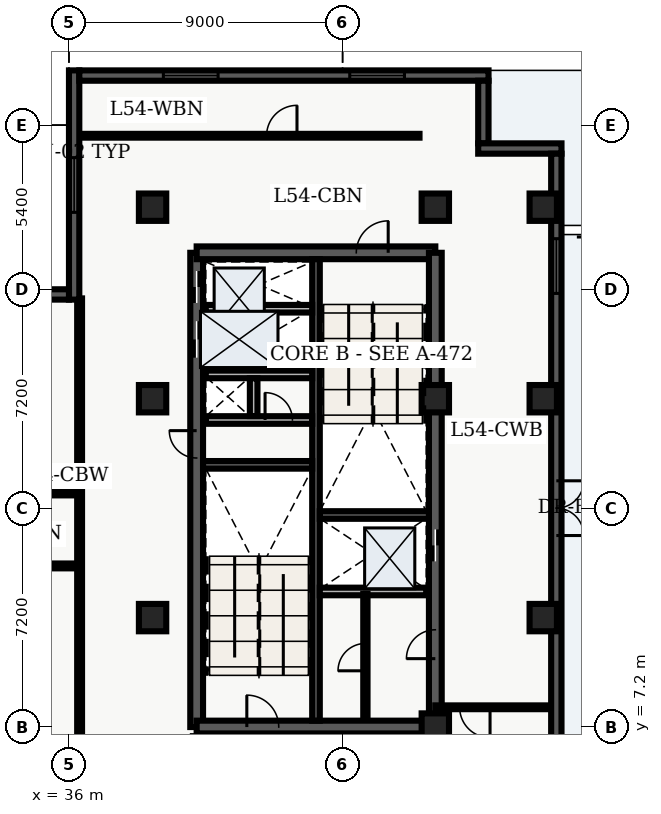
"""IFC4 building model, lengths in metres.
Left out: names, types, materials, properties, quantities, classifications, styles, units other than length and angle.
Written with IfcOpenShell. Run it as: python <this file> out.ifc"""

import sys

from ifc_helpers import new_model, entity, si_unit, converted_unit, direction, frame, origin_with_axes, origin_2d_with_axis, place, context, subcontext, project, spatial, polyline, rectangle, outline, extrude, element, fill, save


model = new_model("IFC4")
c1 = context("Model", 3, precision=1e-05, world=origin_with_axes(), true_north=direction((0.0, 1.0)))
c2 = subcontext(c1, "Body", "Model", "MODEL_VIEW")
j1 = project(units=[si_unit("LENGTHUNIT", "METRE"), converted_unit("PLANEANGLEUNIT", "DEGREE", entity("IfcPlaneAngleMeasure", 0.017), si_unit("PLANEANGLEUNIT", "RADIAN"), dimensions=[0, 0, 0, 0, 0, 0, 0])], contexts=[c1])
p1 = place(None, origin_with_axes())
s1 = spatial("IfcSite", under=j1, at=p1, CompositionType="ELEMENT")
p2 = place(p1, origin_with_axes())
s2 = spatial("IfcBuilding", under=s1, at=p2, CompositionType="ELEMENT")
p3 = place(p2, frame((0.0, 0.0, 219.9), z_axis=(0.0, 0.0, 1.0), x_axis=(1.0, 0.0, 0.0)))
s3 = spatial("IfcBuildingStorey", under=s2, at=p3, CompositionType="ELEMENT", Elevation=219.9)
p4 = place(p3, frame((40.2, 7.2, 0.0), z_axis=(0.0, 0.0, 1.0), x_axis=(0.0, 1.0, 0.0)))
e1 = element("IfcWall", 1, at=p4, inside=s3, PredefinedType="SHEAR", context=c2, shape_type="SweptSolid", body=[
    extrude(outline(polyline([(0.0, -0.21), (15.6, -0.21), (15.6, 0.21), (0.0, 0.21), (0.0, -0.21)])), origin_with_axes(), (0.0, 0.0, 1.0), 4.56),
])
p5 = place(p4, frame((14.475, 0.0, 0.0), z_axis=(0.0, 0.0, 1.0), x_axis=(1.0, 0.0, 0.0)))
e2 = element("IfcOpeningElement", 2, at=p5, cuts=e1, PredefinedType="OPENING", context=c2, shape_type="SweptSolid", body=[
    extrude(rectangle(XDim=1.05, YDim=0.44, at=origin_2d_with_axis()), origin_with_axes(), (0.0, 0.0, 1.0), 2.15),
])
p6 = place(p4, frame((12.75, 0.0, 0.0), z_axis=(0.0, 0.0, 1.0), x_axis=(1.0, 0.0, 0.0)))
e3 = element("IfcOpeningElement", 3, at=p6, cuts=e1, PredefinedType="OPENING", context=c2, shape_type="SweptSolid", body=[
    extrude(rectangle(XDim=1.2, YDim=0.44, at=origin_2d_with_axis()), origin_with_axes(), (0.0, 0.0, 1.0), 2.15),
])
p7 = place(p4, frame((9.3, 0.0, 0.0), z_axis=(0.0, 0.0, 1.0), x_axis=(1.0, 0.0, 0.0)))
e4 = element("IfcOpeningElement", 4, at=p7, cuts=e1, PredefinedType="OPENING", context=c2, shape_type="SweptSolid", body=[
    extrude(rectangle(XDim=0.9, YDim=0.44, at=origin_2d_with_axis()), origin_with_axes(), (0.0, 0.0, 1.0), 2.15),
])
p8 = place(p3, frame((40.2, 7.2, 0.0), z_axis=(0.0, 0.0, 1.0), x_axis=(1.0, 0.0, 0.0)))
e5 = element("IfcWall", 5, at=p8, inside=s3, PredefinedType="SHEAR", context=c2, shape_type="SweptSolid", body=[
    extrude(outline(polyline([(0.0, -0.21), (7.85, -0.21), (7.85, 0.21), (0.0, 0.21), (0.0, -0.21)])), origin_with_axes(), (0.0, 0.0, 1.0), 4.56),
])
p9 = place(p8, frame((2.175, 0.0, 0.0), z_axis=(0.0, 0.0, 1.0), x_axis=(1.0, 0.0, 0.0)))
e6 = element("IfcOpeningElement", 6, at=p9, cuts=e5, PredefinedType="OPENING", context=c2, shape_type="SweptSolid", body=[
    extrude(rectangle(XDim=1.05, YDim=0.44, at=origin_2d_with_axis()), origin_with_axes(), (0.0, 0.0, 1.0), 2.15),
])
p10 = place(p3, frame((40.2, 22.8, 0.0), z_axis=(0.0, 0.0, 1.0), x_axis=(1.0, 0.0, 0.0)))
e7 = element("IfcWall", 7, at=p10, inside=s3, PredefinedType="SHEAR", context=c2, shape_type="SweptSolid", body=[
    extrude(outline(polyline([(0.0, -0.21), (7.85, -0.21), (7.85, 0.21), (0.0, 0.21), (0.0, -0.21)])), origin_with_axes(), (0.0, 0.0, 1.0), 4.56),
])
p11 = place(p10, frame((5.775, 0.0, 0.0), z_axis=(0.0, 0.0, 1.0), x_axis=(1.0, 0.0, 0.0)))
e8 = element("IfcOpeningElement", 8, at=p11, cuts=e7, PredefinedType="OPENING", context=c2, shape_type="SweptSolid", body=[
    extrude(rectangle(XDim=1.05, YDim=0.44, at=origin_2d_with_axis()), origin_with_axes(), (0.0, 0.0, 1.0), 2.15),
])
p12 = place(p3, frame((48.05, 7.2, 0.0), z_axis=(0.0, 0.0, 1.0), x_axis=(0.0, 1.0, 0.0)))
e9 = element("IfcWall", 9, at=p12, inside=s3, PredefinedType="SHEAR", context=c2, shape_type="SweptSolid", body=[
    extrude(outline(polyline([(0.0, -0.21), (15.6, -0.21), (15.6, 0.21), (0.0, 0.21), (0.0, -0.21)])), origin_with_axes(), (0.0, 0.0, 1.0), 4.56),
])
p13 = place(p12, frame((5.975, 0.0, 0.0), z_axis=(0.0, 0.0, 1.0), x_axis=(1.0, 0.0, 0.0)))
e10 = element("IfcOpeningElement", 10, at=p13, cuts=e9, PredefinedType="OPENING", context=c2, shape_type="SweptSolid", body=[
    extrude(rectangle(XDim=1.05, YDim=0.44, at=origin_2d_with_axis()), origin_with_axes(), (0.0, 0.0, 1.0), 2.15),
])
p14 = place(p12, frame((2.725, 0.0, 0.0), z_axis=(0.0, 0.0, 1.0), x_axis=(1.0, 0.0, 0.0)))
e11 = element("IfcOpeningElement", 11, at=p14, cuts=e9, PredefinedType="OPENING", context=c2, shape_type="SweptSolid", body=[
    extrude(rectangle(XDim=0.95, YDim=0.44, at=origin_2d_with_axis()), origin_with_axes(), (0.0, 0.0, 1.0), 2.15),
])
p15 = place(p3, frame((44.125, 7.41, 0.0), z_axis=(0.0, 0.0, 1.0), x_axis=(0.0, 1.0, 0.0)))
e12 = element("IfcWall", 12, at=p15, inside=s3, PredefinedType="SHEAR", context=c2, shape_type="SweptSolid", body=[
    extrude(outline(polyline([(0.0, -0.125), (15.18, -0.125), (15.18, 0.125), (0.0, 0.125), (0.0, -0.125)])), origin_with_axes(), (0.0, 0.0, 1.0), 4.56),
])
for number, where, z_axis, x_axis in (
    (13, (40.41, 15.825, 0.0), (0.0, 0.0, 1.0), (1.0, 0.0, 0.0)),
    (14, (44.25, 14.175, 0.0), (0.0, 0.0, 1.0), (1.0, 0.0, 0.0)),
):
    element("IfcWall", number, at=place(p3, frame(where, z_axis=z_axis, x_axis=x_axis)), inside=s3, PredefinedType="SHEAR", context=c2, shape_type="SweptSolid", body=[
        extrude(outline(polyline([(0.0, -0.125), (3.59, -0.125), (3.59, 0.125), (0.0, 0.125), (0.0, -0.125)])), origin_with_axes(), (0.0, 0.0, 1.0), 4.56),
    ])
p16 = place(p3, frame((40.5, 17.3, 0.0), z_axis=(0.0, 0.0, 1.0), x_axis=(1.0, 0.0, 0.0)))
e15 = element("IfcWall", 15, at=p16, inside=s3, PredefinedType="SOLIDWALL", context=c2, shape_type="SweptSolid", body=[
    extrude(outline(polyline([(0.0, -0.125), (3.5, -0.125), (3.5, 0.125), (0.0, 0.125), (0.0, -0.125)])), origin_with_axes(), (0.0, 0.0, 1.0), 3.6),
])
p17 = place(p16, frame((2.4, 0.0, 0.0), z_axis=(0.0, 0.0, 1.0), x_axis=(1.0, 0.0, 0.0)))
e16 = element("IfcOpeningElement", 16, at=p17, cuts=e15, PredefinedType="OPENING", context=c2, shape_type="SweptSolid", body=[
    extrude(rectangle(XDim=0.9, YDim=0.27, at=origin_2d_with_axis()), origin_with_axes(), (0.0, 0.0, 1.0), 2.15),
])
p18 = place(p3, frame((40.5, 18.8, 0.0), z_axis=(0.0, 0.0, 1.0), x_axis=(1.0, 0.0, 0.0)))
e17 = element("IfcWall", 17, at=p18, inside=s3, PredefinedType="SOLIDWALL", context=c2, shape_type="SweptSolid", body=[
    extrude(outline(polyline([(0.0, -0.125), (3.5, -0.125), (3.5, 0.125), (0.0, 0.125), (0.0, -0.125)])), origin_with_axes(), (0.0, 0.0, 1.0), 3.6),
])
p19 = place(p3, frame((42.075, 17.43, 0.0), z_axis=(0.0, 0.0, 1.0), x_axis=(0.0, 1.0, 0.0)))
e18 = element("IfcWall", 18, at=p19, inside=s3, PredefinedType="SOLIDWALL", context=c2, shape_type="SweptSolid", body=[
    extrude(outline(polyline([(0.0, -0.125), (1.24, -0.125), (1.24, 0.125), (0.0, 0.125), (0.0, -0.125)])), origin_with_axes(), (0.0, 0.0, 1.0), 3.6),
])
for number, where, z_axis, x_axis in (
    (19, (38.75, 10.8, 0.0), (0.0, 0.0, 1.0), (1.0, 0.0, 0.0)),
    (20, (38.75, 18.0, 0.0), (0.0, 0.0, 1.0), (1.0, 0.0, 0.0)),
    (21, (38.75, 24.3, 0.0), (0.0, 0.0, 1.0), (1.0, 0.0, 0.0)),
    (22, (48.05, 7.2, 0.0), (0.0, 0.0, 1.0), (1.0, 0.0, 0.0)),
    (23, (48.05, 18.0, 0.0), (0.0, 0.0, 1.0), (1.0, 0.0, 0.0)),
    (24, (48.05, 24.3, 0.0), (0.0, 0.0, 1.0), (1.0, 0.0, 0.0)),
    (25, (51.6, 10.8, 0.0), (0.0, 0.0, 1.0), (1.0, 0.0, 0.0)),
    (26, (51.6, 18.0, 0.0), (0.0, 0.0, 1.0), (1.0, 0.0, 0.0)),
    (27, (51.6, 24.3, 0.0), (0.0, 0.0, 1.0), (1.0, 0.0, 0.0)),
):
    element("IfcColumn", number, at=place(p3, frame(where, z_axis=z_axis, x_axis=x_axis)), inside=s3, PredefinedType="COLUMN", context=c2, shape_type="SweptSolid", body=[
        extrude(rectangle(XDim=0.9, YDim=0.9, at=origin_2d_with_axis()), origin_with_axes(), (0.0, 0.0, 1.0), 4.8),
    ])
for number, where, z_axis, x_axis in (
    (28, (40.5, 20.96, 0.0), (0.0, 0.0, 1.0), (1.0, 0.0, 0.0)),
    (29, (44.25, 11.66, 0.0), (0.0, 0.0, 1.0), (1.0, 0.0, 0.0)),
):
    element("IfcWall", number, at=place(p3, frame(where, z_axis=z_axis, x_axis=x_axis)), inside=s3, PredefinedType="SOLIDWALL", context=c2, shape_type="SweptSolid", body=[
        extrude(outline(polyline([(0.0, -0.125), (3.5, -0.125), (3.5, 0.125), (0.0, 0.125), (0.0, -0.125)])), origin_with_axes(), (0.0, 0.0, 1.0), 3.2),
    ])
p20 = place(p3, frame((45.75, 7.5, 0.0), z_axis=(0.0, 0.0, 1.0), x_axis=(0.0, 1.0, 0.0)))
e30 = element("IfcWall", 30, at=p20, inside=s3, PredefinedType="PARTITIONING", context=c2, shape_type="SweptSolid", body=[
    extrude(outline(polyline([(0.0, -0.07), (4.08, -0.07), (4.08, 0.07), (0.0, 0.07), (0.0, -0.07)])), origin_with_axes(), (0.0, 0.0, 1.0), 3.2),
])
p21 = place(p20, frame((2.0, 0.0, 0.0), z_axis=(0.0, 0.0, 1.0), x_axis=(1.0, 0.0, 0.0)))
e31 = element("IfcOpeningElement", 31, at=p21, cuts=e30, PredefinedType="OPENING", context=c2, shape_type="SweptSolid", body=[
    extrude(rectangle(XDim=0.9, YDim=0.16, at=origin_2d_with_axis()), origin_with_axes(), (0.0, 0.0, 1.0), 2.15),
])
p22 = place(p3, frame((21.15, 12.5, 0.0), z_axis=(0.0, 0.0, 1.0), x_axis=(1.0, 0.0, 0.0)))
e32 = element("IfcWall", 32, at=p22, inside=s3, PredefinedType="PARTITIONING", context=c2, shape_type="SweptSolid", body=[
    extrude(outline(polyline([(0.0, -0.08), (15.2, -0.08), (15.2, 0.08), (0.0, 0.08), (0.0, -0.08)])), origin_with_axes(), (0.0, 0.0, 1.0), 3.2),
])
p23 = place(p22, frame((7.65, 0.0, 0.0), z_axis=(0.0, 0.0, 1.0), x_axis=(1.0, 0.0, 0.0)))
e33 = element("IfcOpeningElement", 33, at=p23, cuts=e32, PredefinedType="OPENING", context=c2, shape_type="SweptSolid", body=[
    extrude(rectangle(XDim=1.0, YDim=0.18, at=origin_2d_with_axis()), origin_with_axes(), (0.0, 0.0, 1.0), 2.15),
])
p24 = place(p3, frame((21.15, 14.9, 0.0), z_axis=(0.0, 0.0, 1.0), x_axis=(1.0, 0.0, 0.0)))
e34 = element("IfcWall", 34, at=p24, inside=s3, PredefinedType="PARTITIONING", context=c2, shape_type="SweptSolid", body=[
    extrude(outline(polyline([(0.0, -0.08), (15.2, -0.08), (15.2, 0.08), (0.0, 0.08), (0.0, -0.08)])), origin_with_axes(), (0.0, 0.0, 1.0), 3.2),
])
p25 = place(p24, frame((3.583, 0.0, 0.0), z_axis=(0.0, 0.0, 1.0), x_axis=(1.0, 0.0, 0.0)))
e35 = element("IfcOpeningElement", 35, at=p25, cuts=e34, PredefinedType="OPENING", context=c2, shape_type="SweptSolid", body=[
    extrude(rectangle(XDim=1.0, YDim=0.18, at=origin_2d_with_axis()), origin_with_axes(), (0.0, 0.0, 1.0), 2.15),
])
p26 = place(p24, frame((11.053, 0.0, 0.0), z_axis=(0.0, 0.0, 1.0), x_axis=(1.0, 0.0, 0.0)))
e36 = element("IfcOpeningElement", 36, at=p26, cuts=e34, PredefinedType="OPENING", context=c2, shape_type="SweptSolid", body=[
    extrude(rectangle(XDim=1.0, YDim=0.18, at=origin_2d_with_axis()), origin_with_axes(), (0.0, 0.0, 1.0), 2.15),
])
p27 = place(p3, frame((36.35, 4.35, 0.0), z_axis=(0.0, 0.0, 1.0), x_axis=(0.0, 1.0, 0.0)))
e37 = element("IfcWall", 37, at=p27, inside=s3, PredefinedType="PARTITIONING", context=c2, shape_type="SweptSolid", body=[
    extrude(outline(polyline([(0.0, -0.08), (16.95, -0.08), (16.95, 0.08), (0.0, 0.08), (0.0, -0.08)])), origin_with_axes(), (0.0, 0.0, 1.0), 3.2),
])
p28 = place(p3, frame((51.865, 7.85, 0.0), z_axis=(0.0, 0.0, 1.0), x_axis=(-1.0, 0.0, 0.0)))
e38 = element("IfcWall", 38, at=p28, inside=s3, PredefinedType="PARTITIONING", context=c2, shape_type="SweptSolid", body=[
    extrude(outline(polyline([(0.0, -0.062), (3.815, -0.062), (3.815, 0.062), (0.0, 0.062), (0.0, -0.062)])), origin_with_axes(), (0.0, 0.0, 1.0), 3.2),
])
p29 = place(p28, frame((2.515, 0.0, 0.0), z_axis=(0.0, 0.0, 1.0), x_axis=(1.0, 0.0, 0.0)))
e39 = element("IfcOpeningElement", 39, at=p29, cuts=e38, PredefinedType="OPENING", context=c2, shape_type="SweptSolid", body=[
    extrude(rectangle(XDim=1.0, YDim=0.145, at=origin_2d_with_axis()), origin_with_axes(), (0.0, 0.0, 1.0), 2.15),
])
p30 = place(p3, frame((36.335, 26.65, 0.0), z_axis=(0.0, 0.0, 1.0), x_axis=(1.0, 0.0, 0.0)))
e40 = element("IfcWall", 40, at=p30, inside=s3, PredefinedType="PARTITIONING", context=c2, shape_type="SweptSolid", body=[
    extrude(outline(polyline([(0.0, -0.062), (11.195, -0.062), (11.195, 0.062), (0.0, 0.062), (0.0, -0.062)])), origin_with_axes(), (0.0, 0.0, 1.0), 3.2),
])
p31 = place(p30, frame((6.665, 0.0, 0.0), z_axis=(0.0, 0.0, 1.0), x_axis=(1.0, 0.0, 0.0)))
e41 = element("IfcOpeningElement", 41, at=p31, cuts=e40, PredefinedType="OPENING", context=c2, shape_type="SweptSolid", body=[
    extrude(rectangle(XDim=1.0, YDim=0.145, at=origin_2d_with_axis()), origin_with_axes(), (0.0, 0.0, 1.0), 2.15),
])
p32 = place(p3, frame((36.17, 21.26, 0.0), z_axis=(0.0, 0.0, 1.0), x_axis=(0.0, 1.0, 0.0)))
e42 = element("IfcWall", 42, at=p32, inside=s3, PredefinedType="SOLIDWALL", context=c2, shape_type="SweptSolid", body=[
    extrude(outline(polyline([(0.0, -0.17), (7.54, -0.17), (7.54, 0.17), (0.0, 0.17), (0.0, -0.17)])), origin_with_axes(), (0.0, 0.0, 1.0), 4.56),
])
p33 = place(p32, frame((3.77, 0.0, 0.45), z_axis=(0.0, 0.0, 1.0), x_axis=(1.0, 0.0, 0.0)))
e43 = element("IfcOpeningElement", 43, at=p33, cuts=e42, PredefinedType="OPENING", context=c2, shape_type="SweptSolid", body=[
    extrude(rectangle(XDim=1.8, YDim=0.36, at=origin_2d_with_axis()), origin_with_axes(), (0.0, 0.0, 1.0), 2.1),
])
p34 = place(p3, frame((36.34, 28.63, 0.0), z_axis=(0.0, 0.0, 1.0), x_axis=(1.0, 0.0, 0.0)))
e44 = element("IfcWall", 44, at=p34, inside=s3, PredefinedType="SOLIDWALL", context=c2, shape_type="SweptSolid", body=[
    extrude(outline(polyline([(0.0, -0.17), (13.46, -0.17), (13.46, 0.17), (0.0, 0.17), (0.0, -0.17)])), origin_with_axes(), (0.0, 0.0, 1.0), 4.56),
])
p35 = place(p34, frame((3.665, 0.0, 0.45), z_axis=(0.0, 0.0, 1.0), x_axis=(1.0, 0.0, 0.0)))
e45 = element("IfcOpeningElement", 45, at=p35, cuts=e44, PredefinedType="OPENING", context=c2, shape_type="SweptSolid", body=[
    extrude(rectangle(XDim=1.8, YDim=0.36, at=origin_2d_with_axis()), origin_with_axes(), (0.0, 0.0, 1.0), 2.1),
])
p36 = place(p34, frame((9.795, 0.0, 0.45), z_axis=(0.0, 0.0, 1.0), x_axis=(1.0, 0.0, 0.0)))
e46 = element("IfcOpeningElement", 46, at=p36, cuts=e44, PredefinedType="OPENING", context=c2, shape_type="SweptSolid", body=[
    extrude(rectangle(XDim=1.8, YDim=0.36, at=origin_2d_with_axis()), origin_with_axes(), (0.0, 0.0, 1.0), 2.1),
])
p37 = place(p3, frame((49.63, 28.46, 0.0), z_axis=(0.0, 0.0, 1.0), x_axis=(0.0, -1.0, 0.0)))
e47 = element("IfcWall", 47, at=p37, inside=s3, PredefinedType="SOLIDWALL", context=c2, shape_type="SweptSolid", body=[
    extrude(outline(polyline([(0.0, -0.17), (2.06, -0.17), (2.06, 0.17), (0.0, 0.17), (0.0, -0.17)])), origin_with_axes(), (0.0, 0.0, 1.0), 4.56),
])
p38 = place(p3, frame((49.46, 26.23, 0.0), z_axis=(0.0, 0.0, 1.0), x_axis=(1.0, 0.0, 0.0)))
e48 = element("IfcWall", 48, at=p38, inside=s3, PredefinedType="SOLIDWALL", context=c2, shape_type="SweptSolid", body=[
    extrude(outline(polyline([(0.0, -0.17), (2.74, -0.17), (2.74, 0.17), (0.0, 0.17), (0.0, -0.17)])), origin_with_axes(), (0.0, 0.0, 1.0), 4.56),
])
p39 = place(p3, frame((52.03, 26.06, 0.0), z_axis=(0.0, 0.0, 1.0), x_axis=(0.0, -1.0, 0.0)))
e49 = element("IfcWall", 49, at=p39, inside=s3, PredefinedType="SOLIDWALL", context=c2, shape_type="SweptSolid", body=[
    extrude(outline(polyline([(0.0, -0.17), (23.66, -0.17), (23.66, 0.17), (0.0, 0.17), (0.0, -0.17)])), origin_with_axes(), (0.0, 0.0, 1.0), 4.56),
])
p40 = place(p39, frame((11.66, 0.0, 0.0), z_axis=(0.0, 0.0, 1.0), x_axis=(1.0, 0.0, 0.0)))
e50 = element("IfcOpeningElement", 50, at=p40, cuts=e49, PredefinedType="OPENING", context=c2, shape_type="SweptSolid", body=[
    extrude(rectangle(XDim=1.8, YDim=0.36, at=origin_2d_with_axis()), origin_with_axes(), (0.0, 0.0, 1.0), 2.3),
])
p41 = place(p39, frame((3.696, 0.0, 0.45), z_axis=(0.0, 0.0, 1.0), x_axis=(1.0, 0.0, 0.0)))
e51 = element("IfcOpeningElement", 51, at=p41, cuts=e49, PredefinedType="OPENING", context=c2, shape_type="SweptSolid", body=[
    extrude(rectangle(XDim=1.8, YDim=0.36, at=origin_2d_with_axis()), origin_with_axes(), (0.0, 0.0, 1.0), 2.1),
])
p42 = place(p39, frame((20.364, 0.0, 0.45), z_axis=(0.0, 0.0, 1.0), x_axis=(1.0, 0.0, 0.0)))
e52 = element("IfcOpeningElement", 52, at=p42, cuts=e49, PredefinedType="OPENING", context=c2, shape_type="SweptSolid", body=[
    extrude(rectangle(XDim=1.8, YDim=0.36, at=origin_2d_with_axis()), origin_with_axes(), (0.0, 0.0, 1.0), 2.1),
])
p43 = place(p3, frame((32.06, 21.43, 0.0), z_axis=(0.0, 0.0, 1.0), x_axis=(1.0, 0.0, 0.0)))
e53 = element("IfcWall", 53, at=p43, inside=s3, PredefinedType="SOLIDWALL", context=c2, shape_type="SweptSolid", body=[
    extrude(outline(polyline([(0.0, -0.17), (3.94, -0.17), (3.94, 0.17), (0.0, 0.17), (0.0, -0.17)])), origin_with_axes(), (0.0, 0.0, 1.0), 4.56),
])
p44 = place(p12, frame((5.975, 0.0, 0.0), z_axis=(0.0, 0.0, 1.0), x_axis=(1.0, 0.0, 0.0)))
e54 = element("IfcDoor", 54, at=p44, inside=s3, OperationType="SLIDING_TO_LEFT", PredefinedType="DOOR", context=c2, shape_type="SweptSolid", body=[
    extrude(rectangle(XDim=1.05, YDim=0.09, at=origin_2d_with_axis()), origin_with_axes(), (0.0, 0.0, 1.0), 2.15),
])
fill(e10, e54)
p45 = place(p4, frame((14.475, 0.0, 0.0), z_axis=(0.0, 0.0, 1.0), x_axis=(1.0, 0.0, 0.0)))
e55 = element("IfcDoor", 55, at=p45, inside=s3, OperationType="SLIDING_TO_RIGHT", PredefinedType="DOOR", context=c2, shape_type="SweptSolid", body=[
    extrude(rectangle(XDim=1.05, YDim=0.09, at=origin_2d_with_axis()), origin_with_axes(), (0.0, 0.0, 1.0), 2.15),
])
fill(e2, e55)
p46 = place(p4, frame((12.75, 0.0, 0.0), z_axis=(0.0, 0.0, 1.0), x_axis=(1.0, 0.0, 0.0)))
e56 = element("IfcDoor", 56, at=p46, inside=s3, OperationType="DOUBLE_DOOR_SLIDING", PredefinedType="DOOR", context=c2, shape_type="SweptSolid", body=[
    extrude(rectangle(XDim=1.2, YDim=0.09, at=origin_2d_with_axis()), origin_with_axes(), (0.0, 0.0, 1.0), 2.15),
])
fill(e3, e56)
p47 = place(p4, frame((9.3, 0.0, 0.0), z_axis=(0.0, 0.0, 1.0), x_axis=(1.0, 0.0, 0.0)))
e57 = element("IfcDoor", 57, at=p47, inside=s3, OperationType="SINGLE_SWING_RIGHT", PredefinedType="DOOR", context=c2, shape_type="SweptSolid", body=[
    extrude(rectangle(XDim=0.9, YDim=0.09, at=origin_2d_with_axis()), origin_with_axes(), (0.0, 0.0, 1.0), 2.15),
])
fill(e4, e57)
p48 = place(p16, frame((2.4, 0.0, 0.0), z_axis=(0.0, 0.0, 1.0), x_axis=(1.0, 0.0, 0.0)))
e58 = element("IfcDoor", 58, at=p48, inside=s3, OperationType="SINGLE_SWING_LEFT", PredefinedType="DOOR", context=c2, shape_type="SweptSolid", body=[
    extrude(rectangle(XDim=0.9, YDim=0.09, at=origin_2d_with_axis()), origin_with_axes(), (0.0, 0.0, 1.0), 2.15),
])
fill(e16, e58)
p49 = place(p8, frame((2.175, 0.0, 0.0), z_axis=(0.0, 0.0, 1.0), x_axis=(1.0, 0.0, 0.0)))
e59 = element("IfcDoor", 59, at=p49, inside=s3, OperationType="SINGLE_SWING_LEFT", PredefinedType="DOOR", context=c2, shape_type="SweptSolid", body=[
    extrude(rectangle(XDim=1.05, YDim=0.09, at=origin_2d_with_axis()), origin_with_axes(), (0.0, 0.0, 1.0), 2.15),
])
fill(e6, e59)
p50 = place(p10, frame((5.775, 0.0, 0.0), z_axis=(0.0, 0.0, 1.0), x_axis=(1.0, 0.0, 0.0)))
e60 = element("IfcDoor", 60, at=p50, inside=s3, OperationType="SINGLE_SWING_RIGHT", PredefinedType="DOOR", context=c2, shape_type="SweptSolid", body=[
    extrude(rectangle(XDim=1.05, YDim=0.09, at=origin_2d_with_axis()), origin_with_axes(), (0.0, 0.0, 1.0), 2.15),
])
fill(e8, e60)
p51 = place(p20, frame((2.0, 0.0, 0.0), z_axis=(0.0, 0.0, 1.0), x_axis=(1.0, 0.0, 0.0)))
e61 = element("IfcDoor", 61, at=p51, inside=s3, OperationType="SINGLE_SWING_LEFT", PredefinedType="DOOR", context=c2, shape_type="SweptSolid", body=[
    extrude(rectangle(XDim=0.9, YDim=0.084, at=origin_2d_with_axis()), origin_with_axes(), (0.0, 0.0, 1.0), 2.15),
])
fill(e31, e61)
p52 = place(p12, frame((2.725, 0.0, 0.0), z_axis=(0.0, 0.0, 1.0), x_axis=(1.0, 0.0, 0.0)))
e62 = element("IfcDoor", 62, at=p52, inside=s3, OperationType="SINGLE_SWING_LEFT", PredefinedType="DOOR", context=c2, shape_type="SweptSolid", body=[
    extrude(rectangle(XDim=0.95, YDim=0.09, at=origin_2d_with_axis()), origin_with_axes(), (0.0, 0.0, 1.0), 2.15),
])
fill(e11, e62)
p53 = place(p28, frame((2.515, 0.0, 0.0), z_axis=(0.0, 0.0, 1.0), x_axis=(1.0, 0.0, 0.0)))
e63 = element("IfcDoor", 63, at=p53, inside=s3, OperationType="SINGLE_SWING_LEFT", PredefinedType="DOOR", context=c2, shape_type="SweptSolid", body=[
    extrude(rectangle(XDim=1.0, YDim=0.075, at=origin_2d_with_axis()), origin_with_axes(), (0.0, 0.0, 1.0), 2.15),
])
fill(e39, e63)
p54 = place(p30, frame((6.665, 0.0, 0.0), z_axis=(0.0, 0.0, 1.0), x_axis=(1.0, 0.0, 0.0)))
e64 = element("IfcDoor", 64, at=p54, inside=s3, OperationType="SINGLE_SWING_RIGHT", PredefinedType="DOOR", context=c2, shape_type="SweptSolid", body=[
    extrude(rectangle(XDim=1.0, YDim=0.075, at=origin_2d_with_axis()), origin_with_axes(), (0.0, 0.0, 1.0), 2.15),
])
fill(e41, e64)
p55 = place(p39, frame((11.66, 0.0, 0.0), z_axis=(0.0, 0.0, 1.0), x_axis=(1.0, 0.0, 0.0)))
e65 = element("IfcDoor", 65, at=p55, inside=s3, OperationType="DOUBLE_DOOR_SINGLE_SWING", PredefinedType="DOOR", context=c2, shape_type="SweptSolid", body=[
    extrude(rectangle(XDim=1.8, YDim=0.09, at=origin_2d_with_axis()), origin_with_axes(), (0.0, 0.0, 1.0), 2.3),
])
fill(e50, e65)
p56 = place(p32, frame((3.77, 0.0, 0.45), z_axis=(0.0, 0.0, 1.0), x_axis=(1.0, 0.0, 0.0)))
e66 = element("IfcWindow", 66, at=p56, inside=s3, PredefinedType="WINDOW", context=c2, shape_type="SweptSolid", body=[
    extrude(rectangle(XDim=1.8, YDim=0.09, at=origin_2d_with_axis()), origin_with_axes(), (0.0, 0.0, 1.0), 2.1),
])
fill(e43, e66)
p57 = place(p34, frame((3.665, 0.0, 0.45), z_axis=(0.0, 0.0, 1.0), x_axis=(1.0, 0.0, 0.0)))
e67 = element("IfcWindow", 67, at=p57, inside=s3, PredefinedType="WINDOW", context=c2, shape_type="SweptSolid", body=[
    extrude(rectangle(XDim=1.8, YDim=0.09, at=origin_2d_with_axis()), origin_with_axes(), (0.0, 0.0, 1.0), 2.1),
])
fill(e45, e67)
p58 = place(p34, frame((9.795, 0.0, 0.45), z_axis=(0.0, 0.0, 1.0), x_axis=(1.0, 0.0, 0.0)))
e68 = element("IfcWindow", 68, at=p58, inside=s3, PredefinedType="WINDOW", context=c2, shape_type="SweptSolid", body=[
    extrude(rectangle(XDim=1.8, YDim=0.09, at=origin_2d_with_axis()), origin_with_axes(), (0.0, 0.0, 1.0), 2.1),
])
fill(e46, e68)
p59 = place(p39, frame((3.696, 0.0, 0.45), z_axis=(0.0, 0.0, 1.0), x_axis=(1.0, 0.0, 0.0)))
e69 = element("IfcWindow", 69, at=p59, inside=s3, PredefinedType="WINDOW", context=c2, shape_type="SweptSolid", body=[
    extrude(rectangle(XDim=1.8, YDim=0.09, at=origin_2d_with_axis()), origin_with_axes(), (0.0, 0.0, 1.0), 2.1),
])
fill(e51, e69)
save(model, sys.argv[1])
